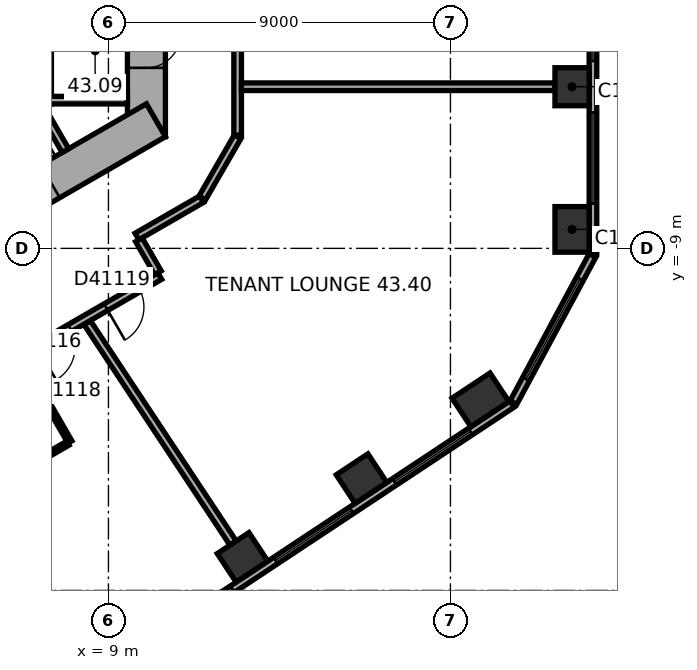
"""IFC4 building model, lengths in metres.
Left out: names, types, materials, properties, quantities, classifications, styles, units other than length and angle.
Written with IfcOpenShell. Run it as: python <this file> out.ifc"""

import sys

from ifc_helpers import new_model, si_unit, direction, frame, frame_2d, origin, origin_2d, place, context, subcontext, project, spatial, rectangle, extrude, element, fill, save


model = new_model("IFC4")
c1 = context("Model", 3, precision=1e-05, world=origin(), true_north=direction((0.0, 1.0)))
c2 = subcontext(c1, "Body", "Model", "MODEL_VIEW")
j1 = project(units=[si_unit("LENGTHUNIT", "METRE"), si_unit("PLANEANGLEUNIT", "RADIAN")], contexts=[c1])
p1 = place(None, origin())
s1 = spatial("IfcSite", under=j1, at=p1, CompositionType="ELEMENT")
p2 = place(p1, origin())
s2 = spatial("IfcBuilding", under=s1, at=p2, CompositionType="ELEMENT")
p3 = place(p2, frame((0.0, 0.0, 176.2)))
s3 = spatial("IfcBuildingStorey", under=s2, at=p3, CompositionType="ELEMENT", Elevation=176.2)
p4 = place(p3, frame((21.2, -8.501, 0.0), z_axis=(0.0, 0.0, 1.0), x_axis=(0.0, 1.0, 0.0)))
e1 = element("IfcColumn", 1, at=p4, inside=s3, PredefinedType="COLUMN", context=c2, shape_type="SweptSolid", body=[
    extrude(rectangle(XDim=1.2, YDim=0.9, at=origin_2d()), origin(), (0.0, 0.0, 1.0), 3.7),
])
for number, where, z_axis, x_axis in (
    (2, (21.2, -4.747, 0.0), (0.0, 0.0, 1.0), (0.0, 1.0, 0.0)),
    (3, (12.529, -17.13, 0.0), (0.0, 0.0, 1.0), (0.834, 0.552, 0.0)),
    (4, (15.659, -15.058, 0.0), (0.0, 0.0, 1.0), (0.834, 0.552, 0.0)),
):
    element("IfcColumn", number, at=place(p3, frame(where, z_axis=z_axis, x_axis=x_axis)), inside=s3, PredefinedType="COLUMN", context=c2, shape_type="SweptSolid", body=[
        extrude(rectangle(XDim=1.0, YDim=0.9, at=origin_2d()), origin(), (0.0, 0.0, 1.0), 3.7),
    ])
p5 = place(p3, frame((18.79, -12.986, 0.0), z_axis=(0.0, 0.0, 1.0), x_axis=(0.833885822067, 0.551936985312, 0.0)))
e5 = element("IfcColumn", 5, at=p5, inside=s3, PredefinedType="COLUMN", context=c2, shape_type="SweptSolid", body=[
    extrude(rectangle(XDim=1.2, YDim=0.9, at=origin_2d()), origin(), (0.0, 0.0, 1.0), 3.7),
])
p6 = place(p3, frame((10.0, -6.062, 0.0), z_axis=(0.0, 0.0, 1.0), x_axis=(0.0, 1.0, 0.0)))
e6 = element("IfcWall", 6, at=p6, inside=s3, PredefinedType="SHEAR", context=c2, shape_type="SweptSolid", body=[
    extrude(rectangle(XDim=12.125, YDim=1.0, at=frame_2d((6.062, 0.0))), origin(), (0.0, 0.0, 1.0), 3.7),
])
p7 = place(p6, frame((6.262, 0.0, 0.0)))
e7 = element("IfcOpeningElement", 7, at=p7, cuts=e6, PredefinedType="OPENING", context=c2, shape_type="SweptSolid", body=[
    extrude(rectangle(XDim=1.5, YDim=2.1, at=frame_2d((0.75, 1.05))), frame((0.0, 0.51, 0.0), z_axis=(0.0, -1.0, 0.0), x_axis=(1.0, 0.0, 0.0)), (0.0, 0.0, 1.0), 1.02),
])
p8 = place(p6, frame((1.812, 0.0, 0.0)))
e8 = element("IfcOpeningElement", 8, at=p8, cuts=e6, PredefinedType="OPENING", context=c2, shape_type="SweptSolid", body=[
    extrude(rectangle(XDim=0.9, YDim=2.1, at=frame_2d((0.45, 1.05))), frame((0.0, 0.51, 0.0), z_axis=(0.0, -1.0, 0.0), x_axis=(1.0, 0.0, 0.0)), (0.0, 0.0, 1.0), 1.02),
])
p9 = place(p6, frame((4.412, 0.0, 0.0)))
e9 = element("IfcOpeningElement", 9, at=p9, cuts=e6, PredefinedType="OPENING", context=c2, shape_type="SweptSolid", body=[
    extrude(rectangle(XDim=0.9, YDim=2.1, at=frame_2d((0.45, 1.05))), frame((0.0, 0.51, 0.0), z_axis=(0.0, -1.0, 0.0), x_axis=(1.0, 0.0, 0.0)), (0.0, 0.0, 1.0), 1.02),
])
p10 = place(p3, frame((-0.25, -11.691, 0.0), z_axis=(0.0, 0.0, 1.0), x_axis=(0.866022616891, 0.50000482701, 0.0)))
e10 = element("IfcWall", 10, at=p10, inside=s3, PredefinedType="SHEAR", context=c2, shape_type="SweptSolid", body=[
    extrude(rectangle(XDim=12.125, YDim=1.0, at=frame_2d((6.062, 0.0))), origin(), (0.0, 0.0, 1.0), 3.7),
])
p11 = place(p10, frame((2.612, 0.0, 0.0)))
e11 = element("IfcOpeningElement", 11, at=p11, cuts=e10, PredefinedType="OPENING", context=c2, shape_type="SweptSolid", body=[
    extrude(rectangle(XDim=1.1, YDim=2.1, at=frame_2d((0.55, 1.05))), frame((0.0, 0.51, 0.0), z_axis=(0.0, -1.0, 0.0), x_axis=(1.0, 0.0, 0.0)), (0.0, 0.0, 1.0), 1.02),
])
p12 = place(p10, frame((5.212, 0.0, 0.0)))
e12 = element("IfcOpeningElement", 12, at=p12, cuts=e10, PredefinedType="OPENING", context=c2, shape_type="SweptSolid", body=[
    extrude(rectangle(XDim=1.1, YDim=2.1, at=frame_2d((0.55, 1.05))), frame((0.0, 0.51, 0.0), z_axis=(0.0, -1.0, 0.0), x_axis=(1.0, 0.0, 0.0)), (0.0, 0.0, 1.0), 1.02),
])
p13 = place(p10, frame((7.812, 0.0, 0.0)))
e13 = element("IfcOpeningElement", 13, at=p13, cuts=e10, PredefinedType="OPENING", context=c2, shape_type="SweptSolid", body=[
    extrude(rectangle(XDim=1.1, YDim=2.1, at=frame_2d((0.55, 1.05))), frame((0.0, 0.51, 0.0), z_axis=(0.0, -1.0, 0.0), x_axis=(1.0, 0.0, 0.0)), (0.0, 0.0, 1.0), 1.02),
])
p14 = place(p3, frame((21.75, -9.138, 0.0), z_axis=(0.0, 0.0, 1.0), x_axis=(0.0, 1.0, 0.0)))
e14 = element("IfcWall", 14, at=p14, inside=s3, PredefinedType="STANDARD", context=c2, shape_type="SweptSolid", body=[
    extrude(rectangle(XDim=20.044, YDim=0.2, at=frame_2d((10.022, 0.0))), origin(), (0.0, 0.0, 1.0), 3.7),
])
p15 = place(p14, frame((1.314, 0.0, 0.9)))
e15 = element("IfcOpeningElement", 15, at=p15, cuts=e14, PredefinedType="OPENING", context=c2, shape_type="SweptSolid", body=[
    extrude(rectangle(XDim=2.4, YDim=2.0, at=frame_2d((1.2, 1.0))), frame((0.0, 0.11, 0.0), z_axis=(0.0, -1.0, 0.0), x_axis=(1.0, 0.0, 0.0)), (0.0, 0.0, 1.0), 0.22),
])
p16 = place(p14, frame((5.069, 0.0, 0.9)))
e16 = element("IfcOpeningElement", 16, at=p16, cuts=e14, PredefinedType="OPENING", context=c2, shape_type="SweptSolid", body=[
    extrude(rectangle(XDim=2.4, YDim=2.0, at=frame_2d((1.2, 1.0))), frame((0.0, 0.11, 0.0), z_axis=(0.0, -1.0, 0.0), x_axis=(1.0, 0.0, 0.0)), (0.0, 0.0, 1.0), 0.22),
])
p17 = place(p14, frame((8.823, 0.0, 0.9)))
e17 = element("IfcOpeningElement", 17, at=p17, cuts=e14, PredefinedType="OPENING", context=c2, shape_type="SweptSolid", body=[
    extrude(rectangle(XDim=2.4, YDim=2.0, at=frame_2d((1.2, 1.0))), frame((0.0, 0.11, 0.0), z_axis=(0.0, -1.0, 0.0), x_axis=(1.0, 0.0, 0.0)), (0.0, 0.0, 1.0), 0.22),
])
p18 = place(p14, frame((12.577, 0.0, 0.9)))
e18 = element("IfcOpeningElement", 18, at=p18, cuts=e14, PredefinedType="OPENING", context=c2, shape_type="SweptSolid", body=[
    extrude(rectangle(XDim=2.4, YDim=2.0, at=frame_2d((1.2, 1.0))), frame((0.0, 0.11, 0.0), z_axis=(0.0, -1.0, 0.0), x_axis=(1.0, 0.0, 0.0)), (0.0, 0.0, 1.0), 0.22),
])
p19 = place(p14, frame((16.331, 0.0, 0.9)))
e19 = element("IfcOpeningElement", 19, at=p19, cuts=e14, PredefinedType="OPENING", context=c2, shape_type="SweptSolid", body=[
    extrude(rectangle(XDim=2.4, YDim=2.0, at=frame_2d((1.2, 1.0))), frame((0.0, 0.11, 0.0), z_axis=(0.0, -1.0, 0.0), x_axis=(1.0, 0.0, 0.0)), (0.0, 0.0, 1.0), 0.22),
])
p20 = place(p3, frame((2.911, -24.156, 0.0), z_axis=(0.0, 0.0, 1.0), x_axis=(0.833882163564, 0.551942512668, 0.0)))
e20 = element("IfcWall", 20, at=p20, inside=s3, PredefinedType="STANDARD", context=c2, shape_type="SweptSolid", body=[
    extrude(rectangle(XDim=20.044, YDim=0.2, at=frame_2d((10.022, 0.0))), origin(), (0.0, 0.0, 1.0), 3.7),
])
p21 = place(p20, frame((1.313, 0.0, 0.9)))
e21 = element("IfcOpeningElement", 21, at=p21, cuts=e20, PredefinedType="OPENING", context=c2, shape_type="SweptSolid", body=[
    extrude(rectangle(XDim=2.4, YDim=2.0, at=frame_2d((1.2, 1.0))), frame((0.0, 0.11, 0.0), z_axis=(0.0, -1.0, 0.0), x_axis=(1.0, 0.0, 0.0)), (0.0, 0.0, 1.0), 0.22),
])
p22 = place(p20, frame((5.067, 0.0, 0.9)))
e22 = element("IfcOpeningElement", 22, at=p22, cuts=e20, PredefinedType="OPENING", context=c2, shape_type="SweptSolid", body=[
    extrude(rectangle(XDim=2.4, YDim=2.0, at=frame_2d((1.2, 1.0))), frame((0.0, 0.11, 0.0), z_axis=(0.0, -1.0, 0.0), x_axis=(1.0, 0.0, 0.0)), (0.0, 0.0, 1.0), 0.22),
])
p23 = place(p20, frame((8.821, 0.0, 0.9)))
e23 = element("IfcOpeningElement", 23, at=p23, cuts=e20, PredefinedType="OPENING", context=c2, shape_type="SweptSolid", body=[
    extrude(rectangle(XDim=2.4, YDim=2.0, at=frame_2d((1.2, 1.0))), frame((0.0, 0.11, 0.0), z_axis=(0.0, -1.0, 0.0), x_axis=(1.0, 0.0, 0.0)), (0.0, 0.0, 1.0), 0.22),
])
p24 = place(p20, frame((12.575, 0.0, 0.9)))
e24 = element("IfcOpeningElement", 24, at=p24, cuts=e20, PredefinedType="OPENING", context=c2, shape_type="SweptSolid", body=[
    extrude(rectangle(XDim=2.4, YDim=2.0, at=frame_2d((1.2, 1.0))), frame((0.0, 0.11, 0.0), z_axis=(0.0, -1.0, 0.0), x_axis=(1.0, 0.0, 0.0)), (0.0, 0.0, 1.0), 0.22),
])
p25 = place(p20, frame((16.329, 0.0, 0.9)))
e25 = element("IfcOpeningElement", 25, at=p25, cuts=e20, PredefinedType="OPENING", context=c2, shape_type="SweptSolid", body=[
    extrude(rectangle(XDim=2.4, YDim=2.0, at=frame_2d((1.2, 1.0))), frame((0.0, 0.11, 0.0), z_axis=(0.0, -1.0, 0.0), x_axis=(1.0, 0.0, 0.0)), (0.0, 0.0, 1.0), 0.22),
])
p26 = place(p3, frame((19.658, -13.057, 0.0), z_axis=(0.0, 0.0, 1.0), x_axis=(0.473307879841, 0.880897071672, 0.0)))
e26 = element("IfcWall", 26, at=p26, inside=s3, PredefinedType="STANDARD", context=c2, shape_type="SweptSolid", body=[
    extrude(rectangle(XDim=4.395, YDim=0.2, at=frame_2d((2.197, 0.0))), origin(), (0.0, 0.0, 1.0), 3.7),
])
p27 = place(p26, frame((0.698, 0.0, 0.9)))
e27 = element("IfcOpeningElement", 27, at=p27, cuts=e26, PredefinedType="OPENING", context=c2, shape_type="SweptSolid", body=[
    extrude(rectangle(XDim=3.0, YDim=2.0, at=frame_2d((1.5, 1.0))), frame((0.0, 0.11, 0.0), z_axis=(0.0, -1.0, 0.0), x_axis=(1.0, 0.0, 0.0)), (0.0, 0.0, 1.0), 0.22),
])
for number, where, z_axis, x_axis in (
    (28, (7.3, -5.1, 0.0), (0.0, 0.0, 1.0), (1.0, 0.0, 0.0)),
    (29, (6.768, -4.522, 0.0), (0.0, 0.0, 1.0), (0.5, -0.866, 0.0)),
):
    element("IfcWall", number, at=place(p3, frame(where, z_axis=z_axis, x_axis=x_axis)), inside=s3, PredefinedType="PARTITIONING", context=c2, shape_type="SweptSolid", body=[
        extrude(rectangle(XDim=2.2, YDim=0.2, at=frame_2d((1.1, 0.0))), origin(), (0.0, 0.0, 1.0), 3.42),
    ])
p28 = place(p3, frame((4.782, -12.944, 0.0), z_axis=(0.0, 0.0, 1.0), x_axis=(0.866022506829, 0.50000501764, 0.0)))
e30 = element("IfcWall", 30, at=p28, inside=s3, PredefinedType="PARTITIONING", context=c2, shape_type="SweptSolid", body=[
    extrude(rectangle(XDim=6.432, YDim=0.2, at=frame_2d((3.216, 0.0))), origin(), (0.0, 0.0, 1.0), 3.42),
])
p29 = place(p28, frame((2.704, 0.0, 0.0)))
e31 = element("IfcOpeningElement", 31, at=p29, cuts=e30, PredefinedType="OPENING", context=c2, shape_type="SweptSolid", body=[
    extrude(rectangle(XDim=1.0, YDim=2.1, at=frame_2d((0.5, 1.05))), frame((0.0, 0.11, 0.0), z_axis=(0.0, -1.0, 0.0), x_axis=(1.0, 0.0, 0.0)), (0.0, 0.0, 1.0), 0.22),
])
p30 = place(p28, frame((4.795, 0.0, 0.0)))
e32 = element("IfcOpeningElement", 32, at=p30, cuts=e30, PredefinedType="OPENING", context=c2, shape_type="SweptSolid", body=[
    extrude(rectangle(XDim=1.0, YDim=2.1, at=frame_2d((0.5, 1.05))), frame((0.0, 0.11, 0.0), z_axis=(0.0, -1.0, 0.0), x_axis=(1.0, 0.0, 0.0)), (0.0, 0.0, 1.0), 0.22),
])
p31 = place(p3, frame((6.737, -11.931, 0.0), z_axis=(0.0, 0.0, 1.0), x_axis=(0.500004234368, -0.866022959057, 0.0)))
e33 = element("IfcWall", 33, at=p31, inside=s3, PredefinedType="PARTITIONING", context=c2, shape_type="SweptSolid", body=[
    extrude(rectangle(XDim=2.5, YDim=0.12, at=frame_2d((1.25, 0.0))), origin(), (0.0, 0.0, 1.0), 3.42),
])
p32 = place(p31, frame((0.8, 0.0, 0.0)))
e34 = element("IfcOpeningElement", 34, at=p32, cuts=e33, PredefinedType="OPENING", context=c2, shape_type="SweptSolid", body=[
    extrude(rectangle(XDim=0.9, YDim=2.1, at=frame_2d((0.45, 1.05))), frame((0.0, 0.07, 0.0), z_axis=(0.0, -1.0, 0.0), x_axis=(1.0, 0.0, 0.0)), (0.0, 0.0, 1.0), 0.14),
])
p33 = place(p3, frame((7.935, -14.126, 0.0), z_axis=(0.0, 0.0, 1.0), x_axis=(-0.866009661879, -0.500027264788, 0.0)))
e35 = element("IfcWall", 35, at=p33, inside=s3, PredefinedType="PARTITIONING", context=c2, shape_type="SweptSolid", body=[
    extrude(rectangle(XDim=2.08, YDim=0.12, at=frame_2d((1.04, 0.0))), origin(), (0.0, 0.0, 1.0), 3.42),
])
p34 = place(p3, frame((9.752, -8.688, 0.0), z_axis=(0.0, 0.0, 1.0), x_axis=(0.865974105138, 0.500088841337, 0.0)))
e36 = element("IfcWall", 36, at=p34, inside=s3, PredefinedType="PARTITIONING", context=c2, shape_type="SweptSolid", body=[
    extrude(rectangle(XDim=1.961, YDim=0.2, at=frame_2d((0.98, 0.0))), origin(), (0.0, 0.0, 1.0), 3.42),
])
p35 = place(p3, frame((10.302, -9.642, 0.0), z_axis=(0.0, 0.0, 1.0), x_axis=(-0.500074377092, 0.865982457891, 0.0)))
e37 = element("IfcWall", 37, at=p35, inside=s3, PredefinedType="PARTITIONING", context=c2, shape_type="SweptSolid", body=[
    extrude(rectangle(XDim=1.001, YDim=0.2, at=frame_2d((0.5, 0.0))), origin(), (0.0, 0.0, 1.0), 3.42),
])
p36 = place(p3, frame((11.47, -7.673, 0.0), z_axis=(0.0, 0.0, 1.0), x_axis=(0.499964847546, 0.866045698112, 0.0)))
e38 = element("IfcWall", 38, at=p36, inside=s3, PredefinedType="PARTITIONING", context=c2, shape_type="SweptSolid", body=[
    extrude(rectangle(XDim=1.86, YDim=0.2, at=frame_2d((0.93, 0.0))), origin(), (0.0, 0.0, 1.0), 3.42),
])
p37 = place(p3, frame((12.281, -16.755, 0.0), z_axis=(0.0, 0.0, 1.0), x_axis=(-0.551925794663, 0.833893228888, 0.0)))
e39 = element("IfcWall", 39, at=p37, inside=s3, PredefinedType="PARTITIONING", context=c2, shape_type="SweptSolid", body=[
    extrude(rectangle(XDim=6.953, YDim=0.2, at=frame_2d((3.476, 0.0))), origin(), (0.0, 0.0, 1.0), 3.42),
])
p38 = place(p3, frame((12.4, -6.022, 0.0), z_axis=(0.0, 0.0, 1.0), x_axis=(0.0, 1.0, 0.0)))
e40 = element("IfcWall", 40, at=p38, inside=s3, PredefinedType="PARTITIONING", context=c2, shape_type="SweptSolid", body=[
    extrude(rectangle(XDim=5.029, YDim=0.2, at=frame_2d((2.515, 0.0))), origin(), (0.0, 0.0, 1.0), 3.42),
])
p39 = place(p3, frame((20.75, -4.747, 0.0), z_axis=(0.0, 0.0, 1.0), x_axis=(-1.0, 0.0, 0.0)))
e41 = element("IfcWall", 41, at=p39, inside=s3, PredefinedType="PARTITIONING", context=c2, shape_type="SweptSolid", body=[
    extrude(rectangle(XDim=8.25, YDim=0.2, at=frame_2d((4.125, 0.0))), origin(), (0.0, 0.0, 1.0), 3.42),
])
p40 = place(p15, origin())
e42 = element("IfcWindow", 42, at=p40, inside=s3, PartitioningType="SINGLE_PANEL", PredefinedType="WINDOW", context=c2, shape_type="SweptSolid", body=[
    extrude(rectangle(XDim=2.4, YDim=2.0, at=frame_2d((1.2, 1.0))), frame((0.0, 0.03, 0.0), z_axis=(0.0, -1.0, 0.0), x_axis=(1.0, 0.0, 0.0)), (0.0, 0.0, 1.0), 0.06),
])
fill(e15, e42)
p41 = place(p16, origin())
e43 = element("IfcWindow", 43, at=p41, inside=s3, PartitioningType="SINGLE_PANEL", PredefinedType="WINDOW", context=c2, shape_type="SweptSolid", body=[
    extrude(rectangle(XDim=2.4, YDim=2.0, at=frame_2d((1.2, 1.0))), frame((0.0, 0.03, 0.0), z_axis=(0.0, -1.0, 0.0), x_axis=(1.0, 0.0, 0.0)), (0.0, 0.0, 1.0), 0.06),
])
fill(e16, e43)
p42 = place(p23, origin())
e44 = element("IfcWindow", 44, at=p42, inside=s3, PartitioningType="SINGLE_PANEL", PredefinedType="WINDOW", context=c2, shape_type="SweptSolid", body=[
    extrude(rectangle(XDim=2.4, YDim=2.0, at=frame_2d((1.2, 1.0))), frame((0.0, 0.03, 0.0), z_axis=(0.0, -1.0, 0.0), x_axis=(1.0, 0.0, 0.0)), (0.0, 0.0, 1.0), 0.06),
])
fill(e23, e44)
p43 = place(p24, origin())
e45 = element("IfcWindow", 45, at=p43, inside=s3, PartitioningType="SINGLE_PANEL", PredefinedType="WINDOW", context=c2, shape_type="SweptSolid", body=[
    extrude(rectangle(XDim=2.4, YDim=2.0, at=frame_2d((1.2, 1.0))), frame((0.0, 0.03, 0.0), z_axis=(0.0, -1.0, 0.0), x_axis=(1.0, 0.0, 0.0)), (0.0, 0.0, 1.0), 0.06),
])
fill(e24, e45)
p44 = place(p25, origin())
e46 = element("IfcWindow", 46, at=p44, inside=s3, PartitioningType="SINGLE_PANEL", PredefinedType="WINDOW", context=c2, shape_type="SweptSolid", body=[
    extrude(rectangle(XDim=2.4, YDim=2.0, at=frame_2d((1.2, 1.0))), frame((0.0, 0.03, 0.0), z_axis=(0.0, -1.0, 0.0), x_axis=(1.0, 0.0, 0.0)), (0.0, 0.0, 1.0), 0.06),
])
fill(e25, e46)
p45 = place(p27, origin())
e47 = element("IfcWindow", 47, at=p45, inside=s3, PartitioningType="SINGLE_PANEL", PredefinedType="WINDOW", context=c2, shape_type="SweptSolid", body=[
    extrude(rectangle(XDim=3.0, YDim=2.0, at=frame_2d((1.5, 1.0))), frame((0.0, 0.03, 0.0), z_axis=(0.0, -1.0, 0.0), x_axis=(1.0, 0.0, 0.0)), (0.0, 0.0, 1.0), 0.06),
])
fill(e27, e47)
p46 = place(p8, origin())
e48 = element("IfcDoor", 48, at=p46, inside=s3, OperationType="SINGLE_SWING_LEFT", PredefinedType="DOOR", context=c2, shape_type="SweptSolid", body=[
    extrude(rectangle(XDim=0.9, YDim=2.1, at=frame_2d((0.45, 1.05))), frame((0.0, 0.025, 0.0), z_axis=(0.0, -1.0, 0.0), x_axis=(1.0, 0.0, 0.0)), (0.0, 0.0, 1.0), 0.05),
])
fill(e8, e48)
p47 = place(p29, origin())
e49 = element("IfcDoor", 49, at=p47, inside=s3, OperationType="SINGLE_SWING_LEFT", PredefinedType="DOOR", context=c2, shape_type="SweptSolid", body=[
    extrude(rectangle(XDim=1.0, YDim=2.1, at=frame_2d((0.5, 1.05))), frame((0.0, 0.025, 0.0), z_axis=(0.0, -1.0, 0.0), x_axis=(1.0, 0.0, 0.0)), (0.0, 0.0, 1.0), 0.05),
])
fill(e31, e49)
p48 = place(p32, origin())
e50 = element("IfcDoor", 50, at=p48, inside=s3, OperationType="SINGLE_SWING_LEFT", PredefinedType="DOOR", context=c2, shape_type="SweptSolid", body=[
    extrude(rectangle(XDim=0.9, YDim=2.1, at=frame_2d((0.45, 1.05))), frame((0.0, 0.025, 0.0), z_axis=(0.0, -1.0, 0.0), x_axis=(1.0, 0.0, 0.0)), (0.0, 0.0, 1.0), 0.05),
])
fill(e34, e50)
p49 = place(p30, origin())
e51 = element("IfcDoor", 51, at=p49, inside=s3, OperationType="SINGLE_SWING_LEFT", PredefinedType="DOOR", context=c2, shape_type="SweptSolid", body=[
    extrude(rectangle(XDim=1.0, YDim=2.1, at=frame_2d((0.5, 1.05))), frame((0.0, 0.025, 0.0), z_axis=(0.0, -1.0, 0.0), x_axis=(1.0, 0.0, 0.0)), (0.0, 0.0, 1.0), 0.05),
])
fill(e32, e51)
save(model, sys.argv[1])
